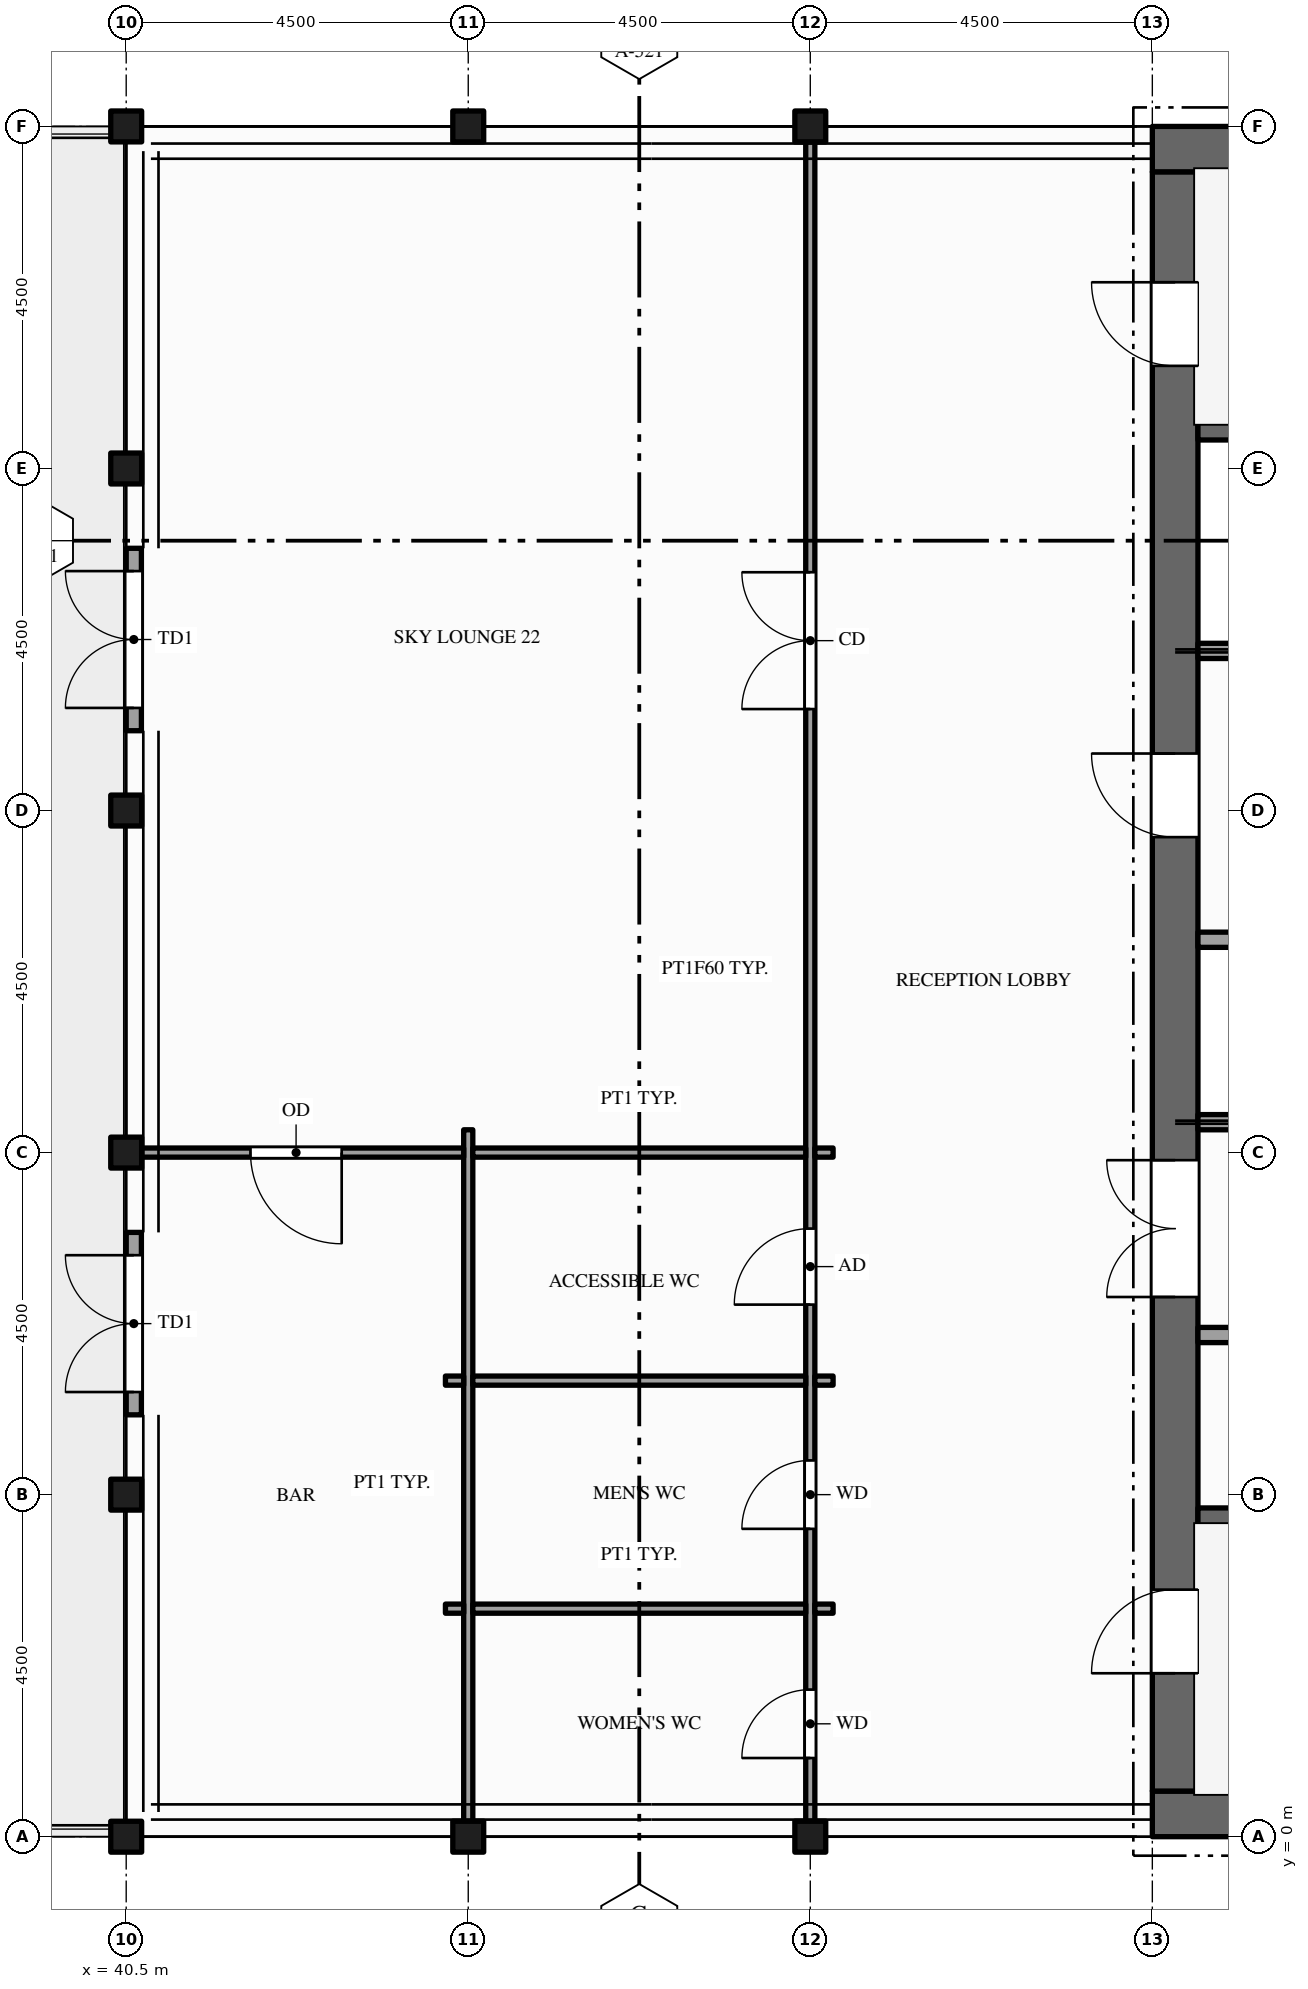
"""IFC4 building model, lengths in metres.
Left out: names, types, materials, properties, quantities, classifications, styles, units other than length and angle.
Written with IfcOpenShell. Run it as: python <this file> out.ifc"""

import sys

from ifc_helpers import new_model, si_unit, direction, frame, frame_2d, origin, place, context, subcontext, project, spatial, rectangle, extrude, element, fill, save


model = new_model("IFC4")
c1 = context("Model", 3, precision=1e-05, world=origin(), true_north=direction((0.0, 1.0)))
c2 = subcontext(c1, "Body", "Model", "MODEL_VIEW")
j1 = project(units=[si_unit("LENGTHUNIT", "METRE"), si_unit("PLANEANGLEUNIT", "RADIAN")], contexts=[c1])
p1 = place(None, origin())
s1 = spatial("IfcSite", under=j1, at=p1, CompositionType="ELEMENT")
p2 = place(p1, origin())
s2 = spatial("IfcBuilding", under=s1, at=p2, CompositionType="ELEMENT")
p3 = place(p2, frame((0.0, 0.0, 345.5)))
s3 = spatial("IfcBuildingStorey", under=s2, at=p3, CompositionType="ELEMENT", Elevation=345.5)
for number, where, z_axis, x_axis in (
    (1, (67.5, 0.3, -0.15), (0.0, 0.0, 1.0), (-1.0, 0.0, 0.0)),
    (2, (54.0, 22.2, -0.15), (0.0, 0.0, 1.0), (1.0, 0.0, 0.0)),
):
    element("IfcWall", number, at=place(p3, frame(where, z_axis=z_axis, x_axis=x_axis)), inside=s3, PredefinedType="SHEAR", context=c2, shape_type="SweptSolid", body=[
        extrude(rectangle(XDim=13.5, YDim=0.6, at=frame_2d((6.75, 0.0))), origin(), (0.0, 0.0, 1.0), 5.0),
    ])
p4 = place(p3, frame((54.3, 0.6, -0.15), z_axis=(0.0, 0.0, 1.0), x_axis=(0.0, 1.0, 0.0)))
e3 = element("IfcWall", 3, at=p4, inside=s3, PredefinedType="SHEAR", context=c2, shape_type="SweptSolid", body=[
    extrude(rectangle(XDim=21.3, YDim=0.6, at=frame_2d((10.65, 0.0))), origin(), (0.0, 0.0, 1.0), 5.0),
])
p5 = place(p4, frame((6.5, 0.0, 0.15)))
e4 = element("IfcOpeningElement", 4, at=p5, cuts=e3, PredefinedType="OPENING", context=c2, shape_type="SweptSolid", body=[
    extrude(rectangle(XDim=1.8, YDim=2.1, at=frame_2d((0.9, 1.05))), frame((0.0, 0.31, 0.0), z_axis=(0.0, -1.0, 0.0), x_axis=(1.0, 0.0, 0.0)), (0.0, 0.0, 1.0), 0.62),
])
p6 = place(p4, frame((12.55, 0.0, 0.15)))
e5 = element("IfcOpeningElement", 5, at=p6, cuts=e3, PredefinedType="OPENING", context=c2, shape_type="SweptSolid", body=[
    extrude(rectangle(XDim=1.1, YDim=2.1, at=frame_2d((0.55, 1.05))), frame((0.0, 0.31, 0.0), z_axis=(0.0, -1.0, 0.0), x_axis=(1.0, 0.0, 0.0)), (0.0, 0.0, 1.0), 0.62),
])
p7 = place(p4, frame((1.55, 0.0, 0.15)))
e6 = element("IfcOpeningElement", 6, at=p7, cuts=e3, PredefinedType="OPENING", context=c2, shape_type="SweptSolid", body=[
    extrude(rectangle(XDim=1.1, YDim=2.1, at=frame_2d((0.55, 1.05))), frame((0.0, 0.31, 0.0), z_axis=(0.0, -1.0, 0.0), x_axis=(1.0, 0.0, 0.0)), (0.0, 0.0, 1.0), 0.62),
])
p8 = place(p4, frame((18.75, 0.0, 0.15)))
e7 = element("IfcOpeningElement", 7, at=p8, cuts=e3, PredefinedType="OPENING", context=c2, shape_type="SweptSolid", body=[
    extrude(rectangle(XDim=1.1, YDim=2.1, at=frame_2d((0.55, 1.05))), frame((0.0, 0.31, 0.0), z_axis=(0.0, -1.0, 0.0), x_axis=(1.0, 0.0, 0.0)), (0.0, 0.0, 1.0), 0.62),
])
p9 = place(p3, frame((40.6, 5.55, 0.0), z_axis=(0.0, 0.0, 1.0), x_axis=(0.0, 1.0, 0.0)))
e8 = element("IfcWall", 8, at=p9, inside=s3, PredefinedType="STANDARD", context=c2, shape_type="SweptSolid", body=[
    extrude(rectangle(XDim=2.4, YDim=0.2, at=frame_2d((1.2, 0.0))), origin(), (0.0, 0.0, 1.0), 4.302),
])
p10 = place(p9, frame((0.3, 0.0, 0.0)))
e9 = element("IfcOpeningElement", 9, at=p10, cuts=e8, PredefinedType="OPENING", context=c2, shape_type="SweptSolid", body=[
    extrude(rectangle(XDim=1.8, YDim=2.4, at=frame_2d((0.9, 1.2))), frame((0.0, 0.11, 0.0), z_axis=(0.0, -1.0, 0.0), x_axis=(1.0, 0.0, 0.0)), (0.0, 0.0, 1.0), 0.22),
])
p11 = place(p3, frame((40.6, 14.55, 0.0), z_axis=(0.0, 0.0, 1.0), x_axis=(0.0, 1.0, 0.0)))
e10 = element("IfcWall", 10, at=p11, inside=s3, PredefinedType="STANDARD", context=c2, shape_type="SweptSolid", body=[
    extrude(rectangle(XDim=2.4, YDim=0.2, at=frame_2d((1.2, 0.0))), origin(), (0.0, 0.0, 1.0), 4.302),
])
p12 = place(p11, frame((0.3, 0.0, 0.0)))
e11 = element("IfcOpeningElement", 11, at=p12, cuts=e10, PredefinedType="OPENING", context=c2, shape_type="SweptSolid", body=[
    extrude(rectangle(XDim=1.8, YDim=2.4, at=frame_2d((0.9, 1.2))), frame((0.0, 0.11, 0.0), z_axis=(0.0, -1.0, 0.0), x_axis=(1.0, 0.0, 0.0)), (0.0, 0.0, 1.0), 0.22),
])
p13 = place(p3, frame((45.0, 0.01, 0.0), z_axis=(0.0, 0.0, 1.0), x_axis=(0.0, 1.0, 0.0)))
e12 = element("IfcWall", 12, at=p13, inside=s3, PredefinedType="PARTITIONING", context=c2, shape_type="SweptSolid", body=[
    extrude(rectangle(XDim=9.29, YDim=0.12, at=frame_2d((4.645, 0.0))), origin(), (0.0, 0.0, 1.0), 3.809),
])
p14 = place(p3, frame((49.5, 0.01, 0.0), z_axis=(0.0, 0.0, 1.0), x_axis=(0.0, 1.0, 0.0)))
e13 = element("IfcWall", 13, at=p14, inside=s3, PredefinedType="PARTITIONING", context=c2, shape_type="SweptSolid", body=[
    extrude(rectangle(XDim=22.48, YDim=0.12, at=frame_2d((11.24, 0.0))), origin(), (0.0, 0.0, 1.0), 3.809),
])
p15 = place(p14, frame((1.025, 0.0, 0.0)))
e14 = element("IfcOpeningElement", 14, at=p15, cuts=e13, PredefinedType="OPENING", context=c2, shape_type="SweptSolid", body=[
    extrude(rectangle(XDim=0.9, YDim=2.1, at=frame_2d((0.45, 1.05))), frame((0.0, 0.07, 0.0), z_axis=(0.0, -1.0, 0.0), x_axis=(1.0, 0.0, 0.0)), (0.0, 0.0, 1.0), 0.14),
])
p16 = place(p14, frame((4.04, 0.0, 0.0)))
e15 = element("IfcOpeningElement", 15, at=p16, cuts=e13, PredefinedType="OPENING", context=c2, shape_type="SweptSolid", body=[
    extrude(rectangle(XDim=0.9, YDim=2.1, at=frame_2d((0.45, 1.05))), frame((0.0, 0.07, 0.0), z_axis=(0.0, -1.0, 0.0), x_axis=(1.0, 0.0, 0.0)), (0.0, 0.0, 1.0), 0.14),
])
p17 = place(p14, frame((6.99, 0.0, 0.0)))
e16 = element("IfcOpeningElement", 16, at=p17, cuts=e13, PredefinedType="OPENING", context=c2, shape_type="SweptSolid", body=[
    extrude(rectangle(XDim=1.0, YDim=2.1, at=frame_2d((0.5, 1.05))), frame((0.0, 0.07, 0.0), z_axis=(0.0, -1.0, 0.0), x_axis=(1.0, 0.0, 0.0)), (0.0, 0.0, 1.0), 0.14),
])
p18 = place(p14, frame((14.825, 0.0, 0.0)))
e17 = element("IfcOpeningElement", 17, at=p18, cuts=e13, PredefinedType="OPENING", context=c2, shape_type="SweptSolid", body=[
    extrude(rectangle(XDim=1.8, YDim=2.1, at=frame_2d((0.9, 1.05))), frame((0.0, 0.07, 0.0), z_axis=(0.0, -1.0, 0.0), x_axis=(1.0, 0.0, 0.0)), (0.0, 0.0, 1.0), 0.14),
])
p19 = place(p3, frame((44.7, 3.0, 0.0), z_axis=(0.0, 0.0, 1.0), x_axis=(1.0, 0.0, 0.0)))
e18 = element("IfcWall", 18, at=p19, inside=s3, PredefinedType="PARTITIONING", context=c2, shape_type="SweptSolid", body=[
    extrude(rectangle(XDim=0.24, YDim=0.12, at=frame_2d((0.12, 0.0))), origin(), (0.0, 0.0, 1.0), 3.809),
])
p20 = place(p3, frame((45.06, 3.0, 0.0), z_axis=(0.0, 0.0, 1.0), x_axis=(1.0, 0.0, 0.0)))
e19 = element("IfcWall", 19, at=p20, inside=s3, PredefinedType="PARTITIONING", context=c2, shape_type="SweptSolid", body=[
    extrude(rectangle(XDim=4.38, YDim=0.12, at=frame_2d((2.19, 0.0))), origin(), (0.0, 0.0, 1.0), 3.809),
])
p21 = place(p3, frame((49.56, 3.0, 0.0), z_axis=(0.0, 0.0, 1.0), x_axis=(1.0, 0.0, 0.0)))
e20 = element("IfcWall", 20, at=p21, inside=s3, PredefinedType="PARTITIONING", context=c2, shape_type="SweptSolid", body=[
    extrude(rectangle(XDim=0.24, YDim=0.12, at=frame_2d((0.12, 0.0))), origin(), (0.0, 0.0, 1.0), 3.809),
])
p22 = place(p3, frame((54.6, 4.2, 0.0), z_axis=(0.0, 0.0, 1.0), x_axis=(1.0, 0.0, 0.0)))
e21 = element("IfcWall", 21, at=p22, inside=s3, PredefinedType="SHEAR", context=c2, shape_type="SweptSolid", body=[
    extrude(rectangle(XDim=6.675, YDim=0.25, at=frame_2d((3.337, 0.0))), origin(), (0.0, 0.0, 1.0), 4.8),
])
p23 = place(p3, frame((44.7, 6.0, 0.0), z_axis=(0.0, 0.0, 1.0), x_axis=(1.0, 0.0, 0.0)))
e22 = element("IfcWall", 22, at=p23, inside=s3, PredefinedType="PARTITIONING", context=c2, shape_type="SweptSolid", body=[
    extrude(rectangle(XDim=0.24, YDim=0.12, at=frame_2d((0.12, 0.0))), origin(), (0.0, 0.0, 1.0), 3.809),
])
p24 = place(p3, frame((45.06, 6.0, 0.0), z_axis=(0.0, 0.0, 1.0), x_axis=(1.0, 0.0, 0.0)))
e23 = element("IfcWall", 23, at=p24, inside=s3, PredefinedType="PARTITIONING", context=c2, shape_type="SweptSolid", body=[
    extrude(rectangle(XDim=4.38, YDim=0.12, at=frame_2d((2.19, 0.0))), origin(), (0.0, 0.0, 1.0), 3.809),
])
p25 = place(p3, frame((49.56, 6.0, 0.0), z_axis=(0.0, 0.0, 1.0), x_axis=(1.0, 0.0, 0.0)))
e24 = element("IfcWall", 24, at=p25, inside=s3, PredefinedType="PARTITIONING", context=c2, shape_type="SweptSolid", body=[
    extrude(rectangle(XDim=0.24, YDim=0.12, at=frame_2d((0.12, 0.0))), origin(), (0.0, 0.0, 1.0), 3.809),
])
p26 = place(p3, frame((54.6, 6.6, 0.0), z_axis=(0.0, 0.0, 1.0), x_axis=(1.0, 0.0, 0.0)))
e25 = element("IfcWall", 25, at=p26, inside=s3, PredefinedType="PARTITIONING", context=c2, shape_type="SweptSolid", body=[
    extrude(rectangle(XDim=7.1, YDim=0.2, at=frame_2d((3.55, 0.0))), origin(), (0.0, 0.0, 1.0), 4.8),
])
p27 = place(p26, frame((3.1, 0.0, 0.0)))
e26 = element("IfcOpeningElement", 26, at=p27, cuts=e25, PredefinedType="OPENING", context=c2, shape_type="SweptSolid", body=[
    extrude(rectangle(XDim=0.9, YDim=2.1, at=frame_2d((0.45, 1.05))), frame((0.0, 0.11, 0.0), z_axis=(0.0, -1.0, 0.0), x_axis=(1.0, 0.0, 0.0)), (0.0, 0.0, 1.0), 0.22),
])
p28 = place(p3, frame((40.51, 9.0, 0.0), z_axis=(0.0, 0.0, 1.0), x_axis=(1.0, 0.0, 0.0)))
e27 = element("IfcWall", 27, at=p28, inside=s3, PredefinedType="PARTITIONING", context=c2, shape_type="SweptSolid", body=[
    extrude(rectangle(XDim=4.43, YDim=0.12, at=frame_2d((2.215, 0.0))), origin(), (0.0, 0.0, 1.0), 3.809),
])
p29 = place(p28, frame((1.625, 0.0, 0.0)))
e28 = element("IfcOpeningElement", 28, at=p29, cuts=e27, PredefinedType="OPENING", context=c2, shape_type="SweptSolid", body=[
    extrude(rectangle(XDim=1.2, YDim=2.1, at=frame_2d((0.6, 1.05))), frame((0.0, 0.07, 0.0), z_axis=(0.0, -1.0, 0.0), x_axis=(1.0, 0.0, 0.0)), (0.0, 0.0, 1.0), 0.14),
])
p30 = place(p3, frame((45.06, 9.0, 0.0), z_axis=(0.0, 0.0, 1.0), x_axis=(1.0, 0.0, 0.0)))
e29 = element("IfcWall", 29, at=p30, inside=s3, PredefinedType="PARTITIONING", context=c2, shape_type="SweptSolid", body=[
    extrude(rectangle(XDim=4.38, YDim=0.12, at=frame_2d((2.19, 0.0))), origin(), (0.0, 0.0, 1.0), 3.809),
])
p31 = place(p3, frame((49.56, 9.0, 0.0), z_axis=(0.0, 0.0, 1.0), x_axis=(1.0, 0.0, 0.0)))
e30 = element("IfcWall", 30, at=p31, inside=s3, PredefinedType="PARTITIONING", context=c2, shape_type="SweptSolid", body=[
    extrude(rectangle(XDim=0.24, YDim=0.12, at=frame_2d((0.12, 0.0))), origin(), (0.0, 0.0, 1.0), 3.809),
])
p32 = place(p3, frame((54.6, 9.4, 0.0), z_axis=(0.0, 0.0, 1.0), x_axis=(1.0, 0.0, 0.0)))
e31 = element("IfcWall", 31, at=p32, inside=s3, PredefinedType="SOLIDWALL", context=c2, shape_type="SweptSolid", body=[
    extrude(rectangle(XDim=2.7, YDim=0.2, at=frame_2d((1.35, 0.0))), origin(), (0.0, 0.0, 1.0), 4.8),
])
p33 = place(p32, frame((0.8, 0.0, 0.012)))
e32 = element("IfcOpeningElement", 32, at=p33, cuts=e31, PredefinedType="OPENING", context=c2, shape_type="SweptSolid", body=[
    extrude(rectangle(XDim=1.1, YDim=2.1, at=frame_2d((0.55, 1.05))), frame((0.0, 0.11, 0.0), z_axis=(0.0, -1.0, 0.0), x_axis=(1.0, 0.0, 0.0)), (0.0, 0.0, 1.0), 0.22),
])
p34 = place(p3, frame((54.6, 11.8, 0.0), z_axis=(0.0, 0.0, 1.0), x_axis=(1.0, 0.0, 0.0)))
e33 = element("IfcWall", 33, at=p34, inside=s3, PredefinedType="SOLIDWALL", context=c2, shape_type="SweptSolid", body=[
    extrude(rectangle(XDim=2.7, YDim=0.2, at=frame_2d((1.35, 0.0))), origin(), (0.0, 0.0, 1.0), 4.8),
])
p35 = place(p3, frame((54.6, 15.6, 0.0), z_axis=(0.0, 0.0, 1.0), x_axis=(1.0, 0.0, 0.0)))
e34 = element("IfcWall", 34, at=p35, inside=s3, PredefinedType="SOLIDWALL", context=c2, shape_type="SweptSolid", body=[
    extrude(rectangle(XDim=2.7, YDim=0.2, at=frame_2d((1.35, 0.0))), origin(), (0.0, 0.0, 1.0), 4.8),
])
p36 = place(p35, frame((0.8, 0.0, 0.012)))
e35 = element("IfcOpeningElement", 35, at=p36, cuts=e34, PredefinedType="OPENING", context=c2, shape_type="SweptSolid", body=[
    extrude(rectangle(XDim=1.1, YDim=2.1, at=frame_2d((0.55, 1.05))), frame((0.0, 0.11, 0.0), z_axis=(0.0, -1.0, 0.0), x_axis=(1.0, 0.0, 0.0)), (0.0, 0.0, 1.0), 0.22),
])
p37 = place(p3, frame((54.6, 18.5, 0.0), z_axis=(0.0, 0.0, 1.0), x_axis=(1.0, 0.0, 0.0)))
e36 = element("IfcWall", 36, at=p37, inside=s3, PredefinedType="SHEAR", context=c2, shape_type="SweptSolid", body=[
    extrude(rectangle(XDim=6.675, YDim=0.25, at=frame_2d((3.337, 0.0))), origin(), (0.0, 0.0, 1.0), 4.8),
])
p38 = place(p10, origin())
e37 = element("IfcDoor", 37, at=p38, inside=s3, OperationType="DOUBLE_DOOR_SINGLE_SWING", PredefinedType="DOOR", context=c2, shape_type="SweptSolid", body=[
    extrude(rectangle(XDim=1.8, YDim=2.4, at=frame_2d((0.9, 1.2))), frame((0.0, 0.025, 0.0), z_axis=(0.0, -1.0, 0.0), x_axis=(1.0, 0.0, 0.0)), (0.0, 0.0, 1.0), 0.05),
])
fill(e9, e37)
p39 = place(p12, origin())
e38 = element("IfcDoor", 38, at=p39, inside=s3, OperationType="DOUBLE_DOOR_SINGLE_SWING", PredefinedType="DOOR", context=c2, shape_type="SweptSolid", body=[
    extrude(rectangle(XDim=1.8, YDim=2.4, at=frame_2d((0.9, 1.2))), frame((0.0, 0.025, 0.0), z_axis=(0.0, -1.0, 0.0), x_axis=(1.0, 0.0, 0.0)), (0.0, 0.0, 1.0), 0.05),
])
fill(e11, e38)
p40 = place(p5, origin())
e39 = element("IfcDoor", 39, at=p40, inside=s3, OperationType="DOUBLE_DOOR_SINGLE_SWING", PredefinedType="DOOR", context=c2, shape_type="SweptSolid", body=[
    extrude(rectangle(XDim=1.8, YDim=2.1, at=frame_2d((0.9, 1.05))), frame((0.0, 0.025, 0.0), z_axis=(0.0, -1.0, 0.0), x_axis=(1.0, 0.0, 0.0)), (0.0, 0.0, 1.0), 0.05),
])
fill(e4, e39)
p41 = place(p6, origin())
e40 = element("IfcDoor", 40, at=p41, inside=s3, OperationType="SINGLE_SWING_RIGHT", PredefinedType="DOOR", context=c2, shape_type="SweptSolid", body=[
    extrude(rectangle(XDim=1.1, YDim=2.1, at=frame_2d((0.55, 1.05))), frame((0.0, 0.025, 0.0), z_axis=(0.0, -1.0, 0.0), x_axis=(1.0, 0.0, 0.0)), (0.0, 0.0, 1.0), 0.05),
])
fill(e5, e40)
p42 = place(p7, origin())
e41 = element("IfcDoor", 41, at=p42, inside=s3, OperationType="SINGLE_SWING_LEFT", PredefinedType="DOOR", context=c2, shape_type="SweptSolid", body=[
    extrude(rectangle(XDim=1.1, YDim=2.1, at=frame_2d((0.55, 1.05))), frame((0.0, 0.025, 0.0), z_axis=(0.0, -1.0, 0.0), x_axis=(1.0, 0.0, 0.0)), (0.0, 0.0, 1.0), 0.05),
])
fill(e6, e41)
p43 = place(p8, origin())
e42 = element("IfcDoor", 42, at=p43, inside=s3, OperationType="SINGLE_SWING_RIGHT", PredefinedType="DOOR", context=c2, shape_type="SweptSolid", body=[
    extrude(rectangle(XDim=1.1, YDim=2.1, at=frame_2d((0.55, 1.05))), frame((0.0, 0.025, 0.0), z_axis=(0.0, -1.0, 0.0), x_axis=(1.0, 0.0, 0.0)), (0.0, 0.0, 1.0), 0.05),
])
fill(e7, e42)
p44 = place(p15, origin())
e43 = element("IfcDoor", 43, at=p44, inside=s3, OperationType="SINGLE_SWING_LEFT", PredefinedType="DOOR", context=c2, shape_type="SweptSolid", body=[
    extrude(rectangle(XDim=0.9, YDim=2.1, at=frame_2d((0.45, 1.05))), frame((0.0, 0.025, 0.0), z_axis=(0.0, -1.0, 0.0), x_axis=(1.0, 0.0, 0.0)), (0.0, 0.0, 1.0), 0.05),
])
fill(e14, e43)
p45 = place(p16, origin())
e44 = element("IfcDoor", 44, at=p45, inside=s3, OperationType="SINGLE_SWING_LEFT", PredefinedType="DOOR", context=c2, shape_type="SweptSolid", body=[
    extrude(rectangle(XDim=0.9, YDim=2.1, at=frame_2d((0.45, 1.05))), frame((0.0, 0.025, 0.0), z_axis=(0.0, -1.0, 0.0), x_axis=(1.0, 0.0, 0.0)), (0.0, 0.0, 1.0), 0.05),
])
fill(e15, e44)
p46 = place(p17, origin())
e45 = element("IfcDoor", 45, at=p46, inside=s3, OperationType="SINGLE_SWING_LEFT", PredefinedType="DOOR", context=c2, shape_type="SweptSolid", body=[
    extrude(rectangle(XDim=1.0, YDim=2.1, at=frame_2d((0.5, 1.05))), frame((0.0, 0.025, 0.0), z_axis=(0.0, -1.0, 0.0), x_axis=(1.0, 0.0, 0.0)), (0.0, 0.0, 1.0), 0.05),
])
fill(e16, e45)
p47 = place(p18, origin())
e46 = element("IfcDoor", 46, at=p47, inside=s3, OperationType="DOUBLE_DOOR_SINGLE_SWING", PredefinedType="DOOR", context=c2, shape_type="SweptSolid", body=[
    extrude(rectangle(XDim=1.8, YDim=2.1, at=frame_2d((0.9, 1.05))), frame((0.0, 0.025, 0.0), z_axis=(0.0, -1.0, 0.0), x_axis=(1.0, 0.0, 0.0)), (0.0, 0.0, 1.0), 0.05),
])
fill(e17, e46)
p48 = place(p29, origin())
e47 = element("IfcDoor", 47, at=p48, inside=s3, OperationType="SINGLE_SWING_RIGHT", PredefinedType="DOOR", context=c2, shape_type="SweptSolid", body=[
    extrude(rectangle(XDim=1.2, YDim=2.1, at=frame_2d((0.6, 1.05))), frame((0.0, 0.025, 0.0), z_axis=(0.0, -1.0, 0.0), x_axis=(1.0, 0.0, 0.0)), (0.0, 0.0, 1.0), 0.05),
])
fill(e28, e47)
save(model, sys.argv[1])
